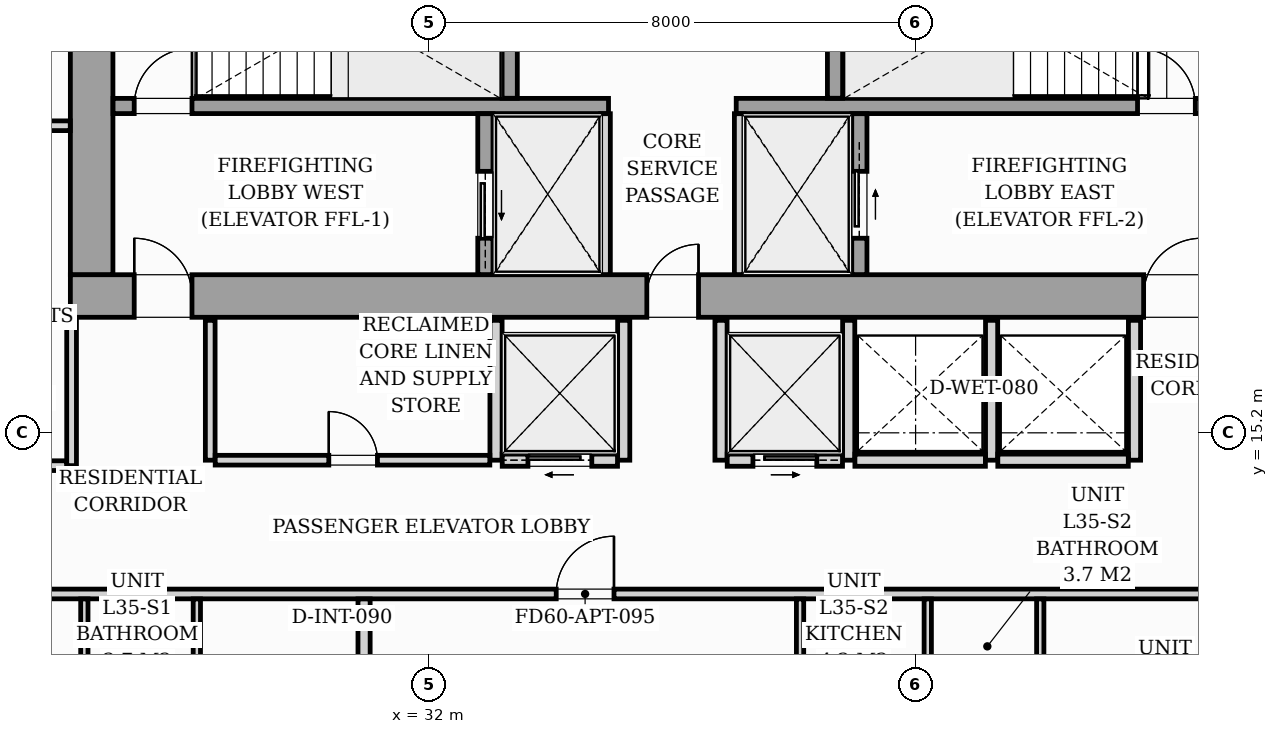
"""IFC4 building model, lengths in metres.
Left out: names, types, materials, properties, quantities, classifications, styles, units other than length and angle.
Written with IfcOpenShell. Run it as: python <this file> out.ifc"""

import sys

from ifc_helpers import new_model, si_unit, direction, frame, frame_2d, origin, origin_2d, place, context, subcontext, project, spatial, rectangle, i_section, extrude, source, transform, mapped, element, fill, save


model = new_model("IFC4")
c1 = context("Model", 3, precision=1e-05, world=origin(), true_north=direction((0.0, 1.0)))
c2 = subcontext(c1, "Body", "Model", "MODEL_VIEW")
j1 = project(units=[si_unit("LENGTHUNIT", "METRE"), si_unit("PLANEANGLEUNIT", "RADIAN")], contexts=[c1])
p1 = place(None, origin())
s1 = spatial("IfcSite", under=j1, at=p1, CompositionType="ELEMENT")
p2 = place(p1, origin())
s2 = spatial("IfcBuilding", under=s1, at=p2, CompositionType="ELEMENT")
p3 = place(p2, frame((0.0, 0.0, 124.6)))
s3 = spatial("IfcBuildingStorey", under=s2, at=p3, CompositionType="ELEMENT", Elevation=124.6)
m1 = source(origin(), c2, "Body", "SweptSolid", [
    extrude(i_section(OverallWidth=0.421, OverallDepth=0.465, WebThickness=0.045, FlangeThickness=0.073, FilletRadius=0.018, at=origin_2d()), origin(), (0.0, 0.0, 1.0), 3.196),
])
for number, where, z_axis, x_axis in (
    (1, (26.4, 17.4, 0.002), (0.0, 0.0, 1.0), (1.0, 0.0, 0.0)),
    (2, (33.12, 17.4, 0.002), (0.0, 0.0, 1.0), (1.0, 0.0, 0.0)),
    (3, (38.88, 17.4, 0.002), (0.0, 0.0, 1.0), (1.0, 0.0, 0.0)),
):
    element("IfcColumn", number, at=place(p3, frame(where, z_axis=z_axis, x_axis=x_axis)), inside=s3, PredefinedType="PILASTER", context=c2, shape_type="MappedRepresentation", body=[
        mapped(m1, transform((0.0, 0.0, 0.0), scale=1.0)),
    ])
p4 = place(p3, frame((26.1, 17.45, 0.0), z_axis=(0.0, 0.0, 1.0), x_axis=(1.0, 0.0, 0.0)))
e4 = element("IfcWall", 4, at=p4, inside=s3, PredefinedType="SHEAR", context=c2, shape_type="SweptSolid", body=[
    extrude(rectangle(XDim=19.8, YDim=0.7, at=frame_2d((9.9, 0.0))), origin(), (0.0, 0.0, 1.0), 3.2),
])
p5 = place(p4, frame((1.05, 0.0, 0.0)))
e5 = element("IfcOpeningElement", 5, at=p5, cuts=e4, PredefinedType="OPENING", context=c2, shape_type="SweptSolid", body=[
    extrude(rectangle(XDim=0.95, YDim=2.06, at=frame_2d((0.475, 1.03))), frame((0.0, 0.36, 0.0), z_axis=(0.0, -1.0, 0.0), x_axis=(1.0, 0.0, 0.0)), (0.0, 0.0, 1.0), 0.72),
])
p6 = place(p4, frame((9.48, 0.0, 0.0)))
e6 = element("IfcOpeningElement", 6, at=p6, cuts=e4, PredefinedType="OPENING", context=c2, shape_type="SweptSolid", body=[
    extrude(rectangle(XDim=0.85, YDim=2.0, at=frame_2d((0.425, 1.0))), frame((0.0, 0.36, 0.0), z_axis=(0.0, -1.0, 0.0), x_axis=(1.0, 0.0, 0.0)), (0.0, 0.0, 1.0), 0.72),
])
p7 = place(p4, frame((17.65, 0.0, 0.0)))
e7 = element("IfcOpeningElement", 7, at=p7, cuts=e4, PredefinedType="OPENING", context=c2, shape_type="SweptSolid", body=[
    extrude(rectangle(XDim=0.95, YDim=2.06, at=frame_2d((0.475, 1.03))), frame((0.0, 0.36, 0.0), z_axis=(0.0, -1.0, 0.0), x_axis=(1.0, 0.0, 0.0)), (0.0, 0.0, 1.0), 0.72),
])
p8 = place(p3, frame((26.45, 17.802, 0.0), z_axis=(0.0, 0.0, 1.0), x_axis=(0.0, 1.0, 0.0)))
e8 = element("IfcWall", 8, at=p8, inside=s3, PredefinedType="SHEAR", context=c2, shape_type="SweptSolid", body=[
    extrude(rectangle(XDim=5.796, YDim=0.7, at=frame_2d((2.898, 0.0))), origin(), (0.0, 0.0, 1.0), 3.2),
])
p9 = place(p3, frame((26.802, 20.575, 0.0), z_axis=(0.0, 0.0, 1.0), x_axis=(1.0, 0.0, 0.0)))
e9 = element("IfcWall", 9, at=p9, inside=s3, PredefinedType="SOLIDWALL", context=c2, shape_type="SweptSolid", body=[
    extrude(rectangle(XDim=8.148, YDim=0.25, at=frame_2d((4.074, 0.0))), origin(), (0.0, 0.0, 1.0), 3.2),
])
p10 = place(p9, frame((0.348, 0.0, 0.0)))
e10 = element("IfcOpeningElement", 10, at=p10, cuts=e9, PredefinedType="OPENING", context=c2, shape_type="SweptSolid", body=[
    extrude(rectangle(XDim=0.95, YDim=2.06, at=frame_2d((0.475, 1.03))), frame((0.0, 0.135, 0.0), z_axis=(0.0, -1.0, 0.0), x_axis=(1.0, 0.0, 0.0)), (0.0, 0.0, 1.0), 0.27),
])
p11 = place(p3, frame((37.05, 20.575, 0.0), z_axis=(0.0, 0.0, 1.0), x_axis=(1.0, 0.0, 0.0)))
e11 = element("IfcWall", 11, at=p11, inside=s3, PredefinedType="SOLIDWALL", context=c2, shape_type="SweptSolid", body=[
    extrude(rectangle(XDim=8.148, YDim=0.25, at=frame_2d((4.074, 0.0))), origin(), (0.0, 0.0, 1.0), 3.2),
])
p12 = place(p11, frame((6.6, 0.0, 0.0)))
e12 = element("IfcOpeningElement", 12, at=p12, cuts=e11, PredefinedType="OPENING", context=c2, shape_type="SweptSolid", body=[
    extrude(rectangle(XDim=0.95, YDim=2.06, at=frame_2d((0.475, 1.03))), frame((0.0, 0.135, 0.0), z_axis=(0.0, -1.0, 0.0), x_axis=(1.0, 0.0, 0.0)), (0.0, 0.0, 1.0), 0.27),
])
for number, where, z_axis, x_axis in (
    (13, (33.325, 20.702, 0.0), (0.0, 0.0, 1.0), (0.0, 1.0, 0.0)),
    (14, (38.675, 20.702, 0.0), (0.0, 0.0, 1.0), (0.0, 1.0, 0.0)),
):
    element("IfcWall", number, at=place(p3, frame(where, z_axis=z_axis, x_axis=x_axis)), inside=s3, PredefinedType="SOLIDWALL", context=c2, shape_type="SweptSolid", body=[
        extrude(rectangle(XDim=2.896, YDim=0.25, at=frame_2d((1.448, 0.0))), origin(), (0.0, 0.0, 1.0), 3.2),
    ])
p13 = place(p3, frame((32.925, 17.802, 0.0), z_axis=(0.0, 0.0, 1.0), x_axis=(0.0, 1.0, 0.0)))
e15 = element("IfcWall", 15, at=p13, inside=s3, PredefinedType="SOLIDWALL", context=c2, shape_type="SweptSolid", body=[
    extrude(rectangle(XDim=2.646, YDim=0.25, at=frame_2d((1.323, 0.0))), origin(), (0.0, 0.0, 1.0), 3.2),
])
p14 = place(p13, frame((0.598, 0.0, 0.0)))
e16 = element("IfcOpeningElement", 16, at=p14, cuts=e15, PredefinedType="OPENING", context=c2, shape_type="SweptSolid", body=[
    extrude(rectangle(XDim=1.1, YDim=2.08, at=frame_2d((0.55, 1.04))), frame((0.0, 0.135, 0.0), z_axis=(0.0, -1.0, 0.0), x_axis=(1.0, 0.0, 0.0)), (0.0, 0.0, 1.0), 0.27),
])
for number, where, z_axis, x_axis in (
    (17, (34.9, 17.802, 0.0), (0.0, 0.0, 1.0), (0.0, 1.0, 0.0)),
    (18, (37.1, 17.802, 0.0), (0.0, 0.0, 1.0), (0.0, 1.0, 0.0)),
):
    element("IfcWall", number, at=place(p3, frame(where, z_axis=z_axis, x_axis=x_axis)), inside=s3, PredefinedType="PARTITIONING", context=c2, shape_type="SweptSolid", body=[
        extrude(rectangle(XDim=2.646, YDim=0.16, at=frame_2d((1.323, 0.0))), origin(), (0.0, 0.0, 1.0), 2.94),
    ])
p15 = place(p3, frame((39.075, 17.802, 0.0), z_axis=(0.0, 0.0, 1.0), x_axis=(0.0, 1.0, 0.0)))
e19 = element("IfcWall", 19, at=p15, inside=s3, PredefinedType="SOLIDWALL", context=c2, shape_type="SweptSolid", body=[
    extrude(rectangle(XDim=2.646, YDim=0.25, at=frame_2d((1.323, 0.0))), origin(), (0.0, 0.0, 1.0), 3.2),
])
p16 = place(p15, frame((0.598, 0.0, 0.0)))
e20 = element("IfcOpeningElement", 20, at=p16, cuts=e19, PredefinedType="OPENING", context=c2, shape_type="SweptSolid", body=[
    extrude(rectangle(XDim=1.1, YDim=2.08, at=frame_2d((0.55, 1.04))), frame((0.0, 0.135, 0.0), z_axis=(0.0, -1.0, 0.0), x_axis=(1.0, 0.0, 0.0)), (0.0, 0.0, 1.0), 0.27),
])
p17 = place(p3, frame((28.4, 14.75, 0.0), z_axis=(0.0, 0.0, 1.0), x_axis=(0.0, 1.0, 0.0)))
e21 = element("IfcWall", 21, at=p17, inside=s3, PredefinedType="PARTITIONING", context=c2, shape_type="SweptSolid", body=[
    extrude(rectangle(XDim=2.3, YDim=0.16, at=frame_2d((1.15, 0.0))), origin(), (0.0, 0.0, 1.0), 2.94),
])
p18 = place(p3, frame((33.1, 14.75, 0.0), z_axis=(0.0, 0.0, 1.0), x_axis=(0.0, 1.0, 0.0)))
e22 = element("IfcWall", 22, at=p18, inside=s3, PredefinedType="PARTITIONING", context=c2, shape_type="SweptSolid", body=[
    extrude(rectangle(XDim=2.3, YDim=0.2, at=frame_2d((1.15, 0.0))), origin(), (0.0, 0.0, 1.0), 2.94),
])
p19 = place(p3, frame((28.482, 14.75, 0.0), z_axis=(0.0, 0.0, 1.0), x_axis=(1.0, 0.0, 0.0)))
e23 = element("IfcWall", 23, at=p19, inside=s3, PredefinedType="PARTITIONING", context=c2, shape_type="SweptSolid", body=[
    extrude(rectangle(XDim=4.516, YDim=0.16, at=frame_2d((2.258, 0.0))), origin(), (0.0, 0.0, 1.0), 2.94),
])
p20 = place(p19, frame((1.868, 0.0, 0.0)))
e24 = element("IfcOpeningElement", 24, at=p20, cuts=e23, PredefinedType="OPENING", context=c2, shape_type="SweptSolid", body=[
    extrude(rectangle(XDim=0.8, YDim=2.05, at=frame_2d((0.4, 1.025))), frame((0.0, 0.09, 0.0), z_axis=(0.0, -1.0, 0.0), x_axis=(1.0, 0.0, 0.0)), (0.0, 0.0, 1.0), 0.18),
])
p21 = place(p3, frame((35.2, 14.75, 0.0), z_axis=(0.0, 0.0, 1.0), x_axis=(0.0, 1.0, 0.0)))
e25 = element("IfcWall", 25, at=p21, inside=s3, PredefinedType="PARTITIONING", context=c2, shape_type="SweptSolid", body=[
    extrude(rectangle(XDim=2.3, YDim=0.2, at=frame_2d((1.15, 0.0))), origin(), (0.0, 0.0, 1.0), 2.94),
])
p22 = place(p3, frame((33.202, 14.75, 0.0), z_axis=(0.0, 0.0, 1.0), x_axis=(1.0, 0.0, 0.0)))
e26 = element("IfcWall", 26, at=p22, inside=s3, PredefinedType="PARTITIONING", context=c2, shape_type="SweptSolid", body=[
    extrude(rectangle(XDim=1.896, YDim=0.2, at=frame_2d((0.948, 0.0))), origin(), (0.0, 0.0, 1.0), 2.94),
])
p23 = place(p22, frame((0.423, 0.0, 0.0)))
e27 = element("IfcOpeningElement", 27, at=p23, cuts=e26, PredefinedType="OPENING", context=c2, shape_type="SweptSolid", body=[
    extrude(rectangle(XDim=1.05, YDim=2.08, at=frame_2d((0.525, 1.04))), frame((0.0, 0.11, 0.0), z_axis=(0.0, -1.0, 0.0), x_axis=(1.0, 0.0, 0.0)), (0.0, 0.0, 1.0), 0.22),
])
for number, where, z_axis, x_axis in (
    (28, (36.8, 14.75, 0.0), (0.0, 0.0, 1.0), (0.0, 1.0, 0.0)),
    (29, (38.9, 14.75, 0.0), (0.0, 0.0, 1.0), (0.0, 1.0, 0.0)),
):
    element("IfcWall", number, at=place(p3, frame(where, z_axis=z_axis, x_axis=x_axis)), inside=s3, PredefinedType="PARTITIONING", context=c2, shape_type="SweptSolid", body=[
        extrude(rectangle(XDim=2.3, YDim=0.2, at=frame_2d((1.15, 0.0))), origin(), (0.0, 0.0, 1.0), 2.94),
    ])
p24 = place(p3, frame((36.902, 14.75, 0.0), z_axis=(0.0, 0.0, 1.0), x_axis=(1.0, 0.0, 0.0)))
e30 = element("IfcWall", 30, at=p24, inside=s3, PredefinedType="PARTITIONING", context=c2, shape_type="SweptSolid", body=[
    extrude(rectangle(XDim=1.896, YDim=0.2, at=frame_2d((0.948, 0.0))), origin(), (0.0, 0.0, 1.0), 2.94),
])
p25 = place(p24, frame((0.423, 0.0, 0.0)))
e31 = element("IfcOpeningElement", 31, at=p25, cuts=e30, PredefinedType="OPENING", context=c2, shape_type="SweptSolid", body=[
    extrude(rectangle(XDim=1.05, YDim=2.08, at=frame_2d((0.525, 1.04))), frame((0.0, 0.11, 0.0), z_axis=(0.0, -1.0, 0.0), x_axis=(1.0, 0.0, 0.0)), (0.0, 0.0, 1.0), 0.22),
])
for number, where, z_axis, x_axis in (
    (32, (41.25, 14.75, 0.0), (0.0, 0.0, 1.0), (0.0, 1.0, 0.0)),
    (33, (43.6, 14.75, 0.0), (0.0, 0.0, 1.0), (0.0, 1.0, 0.0)),
):
    element("IfcWall", number, at=place(p3, frame(where, z_axis=z_axis, x_axis=x_axis)), inside=s3, PredefinedType="PARTITIONING", context=c2, shape_type="SweptSolid", body=[
        extrude(rectangle(XDim=2.3, YDim=0.2, at=frame_2d((1.15, 0.0))), origin(), (0.0, 0.0, 1.0), 2.94),
    ])
for number, where, z_axis, x_axis in (
    (34, (39.002, 14.75, 0.0), (0.0, 0.0, 1.0), (1.0, 0.0, 0.0)),
    (35, (41.352, 14.75, 0.0), (0.0, 0.0, 1.0), (1.0, 0.0, 0.0)),
):
    element("IfcWall", number, at=place(p3, frame(where, z_axis=z_axis, x_axis=x_axis)), inside=s3, PredefinedType="PARTITIONING", context=c2, shape_type="SweptSolid", body=[
        extrude(rectangle(XDim=2.146, YDim=0.2, at=frame_2d((1.073, 0.0))), origin(), (0.0, 0.0, 1.0), 2.94),
    ])
p26 = place(p3, frame((22.05, 12.55, 0.0), z_axis=(0.0, 0.0, 1.0), x_axis=(1.0, 0.0, 0.0)))
e36 = element("IfcWall", 36, at=p26, inside=s3, PredefinedType="PARTITIONING", context=c2, shape_type="SweptSolid", body=[
    extrude(rectangle(XDim=23.83, YDim=0.16, at=frame_2d((11.915, 0.0))), origin(), (0.0, 0.0, 1.0), 2.94),
])
p27 = place(p26, frame((0.655, 0.0, 0.0)))
e37 = element("IfcOpeningElement", 37, at=p27, cuts=e36, PredefinedType="OPENING", context=c2, shape_type="SweptSolid", body=[
    extrude(rectangle(XDim=0.95, YDim=2.06, at=frame_2d((0.475, 1.03))), frame((0.0, 0.09, 0.0), z_axis=(0.0, -1.0, 0.0), x_axis=(1.0, 0.0, 0.0)), (0.0, 0.0, 1.0), 0.18),
])
p28 = place(p26, frame((12.04, 0.0, 0.0)))
e38 = element("IfcOpeningElement", 38, at=p28, cuts=e36, PredefinedType="OPENING", context=c2, shape_type="SweptSolid", body=[
    extrude(rectangle(XDim=0.95, YDim=2.06, at=frame_2d((0.475, 1.03))), frame((0.0, 0.09, 0.0), z_axis=(0.0, -1.0, 0.0), x_axis=(1.0, 0.0, 0.0)), (0.0, 0.0, 1.0), 0.18),
])
p29 = place(p3, frame((28.18, 7.48, 0.0), z_axis=(0.0, 0.0, 1.0), x_axis=(0.0, 1.0, 0.0)))
e39 = element("IfcWall", 39, at=p29, inside=s3, PredefinedType="PARTITIONING", context=c2, shape_type="SweptSolid", body=[
    extrude(rectangle(XDim=4.988, YDim=0.12, at=frame_2d((2.494, 0.0))), origin(), (0.0, 0.0, 1.0), 2.94),
])
p30 = place(p29, frame((1.835, 0.0, 0.0)))
e40 = element("IfcOpeningElement", 40, at=p30, cuts=e39, PredefinedType="OPENING", context=c2, shape_type="SweptSolid", body=[
    extrude(rectangle(XDim=0.9, YDim=2.05, at=frame_2d((0.45, 1.025))), frame((0.0, 0.07, 0.0), z_axis=(0.0, -1.0, 0.0), x_axis=(1.0, 0.0, 0.0)), (0.0, 0.0, 1.0), 0.14),
])
p31 = place(p3, frame((26.33, 10.362, 0.0), z_axis=(0.0, 0.0, 1.0), x_axis=(0.0, 1.0, 0.0)))
e41 = element("IfcWall", 41, at=p31, inside=s3, PredefinedType="PARTITIONING", context=c2, shape_type="SweptSolid", body=[
    extrude(rectangle(XDim=2.106, YDim=0.12, at=frame_2d((1.053, 0.0))), origin(), (0.0, 0.0, 1.0), 2.94),
])
p32 = place(p3, frame((30.93, 10.401, 0.0), z_axis=(0.0, 0.0, 1.0), x_axis=(0.0, 1.0, 0.0)))
e42 = element("IfcWall", 42, at=p32, inside=s3, PredefinedType="PARTITIONING", context=c2, shape_type="SweptSolid", body=[
    extrude(rectangle(XDim=2.067, YDim=0.2, at=frame_2d((1.034, 0.0))), origin(), (0.0, 0.0, 1.0), 2.94),
])
p33 = place(p3, frame((42.05, 6.327, 0.0), z_axis=(0.0, 0.0, 1.0), x_axis=(0.0, 1.0, 0.0)))
e43 = element("IfcWall", 43, at=p33, inside=s3, PredefinedType="PARTITIONING", context=c2, shape_type="SweptSolid", body=[
    extrude(rectangle(XDim=6.141, YDim=0.12, at=frame_2d((3.07, 0.0))), origin(), (0.0, 0.0, 1.0), 2.94),
])
p34 = place(p33, frame((2.873, 0.0, 0.0)))
e44 = element("IfcOpeningElement", 44, at=p34, cuts=e43, PredefinedType="OPENING", context=c2, shape_type="SweptSolid", body=[
    extrude(rectangle(XDim=0.9, YDim=2.05, at=frame_2d((0.45, 1.025))), frame((0.0, 0.07, 0.0), z_axis=(0.0, -1.0, 0.0), x_axis=(1.0, 0.0, 0.0)), (0.0, 0.0, 1.0), 0.14),
])
for number, where, z_axis, x_axis in (
    (45, (40.2, 10.362, 0.0), (0.0, 0.0, 1.0), (0.0, 1.0, 0.0)),
    (46, (38.1, 10.362, 0.0), (0.0, 0.0, 1.0), (0.0, 1.0, 0.0)),
):
    element("IfcWall", number, at=place(p3, frame(where, z_axis=z_axis, x_axis=x_axis)), inside=s3, PredefinedType="PARTITIONING", context=c2, shape_type="SweptSolid", body=[
        extrude(rectangle(XDim=2.106, YDim=0.12, at=frame_2d((1.053, 0.0))), origin(), (0.0, 0.0, 1.0), 2.94),
    ])
p35 = place(p3, frame((24.182, 20.25, 0.0), z_axis=(0.0, 0.0, 1.0), x_axis=(1.0, 0.0, 0.0)))
e47 = element("IfcWall", 47, at=p35, inside=s3, PredefinedType="PARTITIONING", context=c2, shape_type="SweptSolid", body=[
    extrude(rectangle(XDim=1.916, YDim=0.16, at=frame_2d((0.958, 0.0))), origin(), (0.0, 0.0, 1.0), 2.94),
])
p36 = place(p3, frame((26.12, 14.66, 0.0), z_axis=(0.0, 0.0, 1.0), x_axis=(0.0, 1.0, 0.0)))
e48 = element("IfcWall", 48, at=p36, inside=s3, PredefinedType="PARTITIONING", context=c2, shape_type="SweptSolid", body=[
    extrude(rectangle(XDim=2.438, YDim=0.16, at=frame_2d((1.219, 0.0))), origin(), (0.0, 0.0, 1.0), 2.94),
])
p37 = place(p3, frame((24.182, 14.66, 0.0), z_axis=(0.0, 0.0, 1.0), x_axis=(1.0, 0.0, 0.0)))
e49 = element("IfcWall", 49, at=p37, inside=s3, PredefinedType="PARTITIONING", context=c2, shape_type="SweptSolid", body=[
    extrude(rectangle(XDim=1.856, YDim=0.16, at=frame_2d((0.928, 0.0))), origin(), (0.0, 0.0, 1.0), 2.94),
])
m2 = source(origin(), c2, "Body", "SweptSolid", [
    extrude(rectangle(XDim=0.95, YDim=2.06, at=frame_2d((0.475, 1.03))), frame((0.0, 0.025, 0.0), z_axis=(0.0, -1.0, 0.0), x_axis=(1.0, 0.0, 0.0)), (0.0, 0.0, 1.0), 0.05),
])
p38 = place(p5, origin())
e50 = element("IfcDoor", 50, at=p38, inside=s3, OperationType="SINGLE_SWING_LEFT", PredefinedType="DOOR", context=c2, shape_type="MappedRepresentation", body=[
    mapped(m2, transform((0.0, 0.0, 0.0), scale=1.0)),
])
fill(e5, e50)
m3 = source(origin(), c2, "Body", "SweptSolid", [
    extrude(rectangle(XDim=0.85, YDim=2.0, at=frame_2d((0.425, 1.0))), frame((0.0, 0.025, 0.0), z_axis=(0.0, -1.0, 0.0), x_axis=(1.0, 0.0, 0.0)), (0.0, 0.0, 1.0), 0.05),
])
p39 = place(p6, origin())
e51 = element("IfcDoor", 51, at=p39, inside=s3, OperationType="SINGLE_SWING_RIGHT", PredefinedType="DOOR", context=c2, shape_type="MappedRepresentation", body=[
    mapped(m3, transform((0.0, 0.0, 0.0), scale=1.0)),
])
fill(e6, e51)
p40 = place(p7, origin())
e52 = element("IfcDoor", 52, at=p40, inside=s3, OperationType="SINGLE_SWING_RIGHT", PredefinedType="DOOR", context=c2, shape_type="MappedRepresentation", body=[
    mapped(m2, transform((0.0, 0.0, 0.0), scale=1.0)),
])
fill(e7, e52)
p41 = place(p10, origin())
e53 = element("IfcDoor", 53, at=p41, inside=s3, OperationType="SINGLE_SWING_RIGHT", PredefinedType="DOOR", context=c2, shape_type="MappedRepresentation", body=[
    mapped(m2, transform((0.0, 0.0, 0.0), scale=1.0)),
])
fill(e10, e53)
p42 = place(p12, origin())
e54 = element("IfcDoor", 54, at=p42, inside=s3, OperationType="SINGLE_SWING_LEFT", PredefinedType="DOOR", context=c2, shape_type="MappedRepresentation", body=[
    mapped(m2, transform((0.0, 0.0, 0.0), scale=1.0)),
])
fill(e12, e54)
m4 = source(origin(), c2, "Body", "SweptSolid", [
    extrude(rectangle(XDim=1.1, YDim=2.08, at=frame_2d((0.55, 1.04))), frame((0.0, 0.025, 0.0), z_axis=(0.0, -1.0, 0.0), x_axis=(1.0, 0.0, 0.0)), (0.0, 0.0, 1.0), 0.05),
])
p43 = place(p14, origin())
e55 = element("IfcDoor", 55, at=p43, inside=s3, OperationType="SLIDING_TO_LEFT", PredefinedType="DOOR", context=c2, shape_type="MappedRepresentation", body=[
    mapped(m4, transform((0.0, 0.0, 0.0), scale=1.0)),
])
fill(e16, e55)
p44 = place(p16, origin())
e56 = element("IfcDoor", 56, at=p44, inside=s3, OperationType="SLIDING_TO_RIGHT", PredefinedType="DOOR", context=c2, shape_type="MappedRepresentation", body=[
    mapped(m4, transform((0.0, 0.0, 0.0), scale=1.0)),
])
fill(e20, e56)
m5 = source(origin(), c2, "Body", "SweptSolid", [
    extrude(rectangle(XDim=0.8, YDim=2.05, at=frame_2d((0.4, 1.025))), frame((0.0, 0.025, 0.0), z_axis=(0.0, -1.0, 0.0), x_axis=(1.0, 0.0, 0.0)), (0.0, 0.0, 1.0), 0.05),
])
p45 = place(p20, origin())
e57 = element("IfcDoor", 57, at=p45, inside=s3, OperationType="SINGLE_SWING_LEFT", PredefinedType="DOOR", context=c2, shape_type="MappedRepresentation", body=[
    mapped(m5, transform((0.0, 0.0, 0.0), scale=1.0)),
])
fill(e24, e57)
m6 = source(origin(), c2, "Body", "SweptSolid", [
    extrude(rectangle(XDim=1.05, YDim=2.08, at=frame_2d((0.525, 1.04))), frame((0.0, 0.025, 0.0), z_axis=(0.0, -1.0, 0.0), x_axis=(1.0, 0.0, 0.0)), (0.0, 0.0, 1.0), 0.05),
])
p46 = place(p23, origin())
e58 = element("IfcDoor", 58, at=p46, inside=s3, OperationType="SLIDING_TO_LEFT", PredefinedType="DOOR", context=c2, shape_type="MappedRepresentation", body=[
    mapped(m6, transform((0.0, 0.0, 0.0), scale=1.0)),
])
fill(e27, e58)
p47 = place(p25, origin())
e59 = element("IfcDoor", 59, at=p47, inside=s3, OperationType="SLIDING_TO_RIGHT", PredefinedType="DOOR", context=c2, shape_type="MappedRepresentation", body=[
    mapped(m6, transform((0.0, 0.0, 0.0), scale=1.0)),
])
fill(e31, e59)
m7 = source(origin(), c2, "Body", "SweptSolid", [
    extrude(rectangle(XDim=0.95, YDim=2.06, at=frame_2d((0.475, 1.03))), frame((0.0, 0.025, 0.0), z_axis=(0.0, -1.0, 0.0), x_axis=(1.0, 0.0, 0.0)), (0.0, 0.0, 1.0), 0.05),
])
p48 = place(p28, origin())
e60 = element("IfcDoor", 60, at=p48, inside=s3, OperationType="SINGLE_SWING_RIGHT", PredefinedType="DOOR", context=c2, shape_type="MappedRepresentation", body=[
    mapped(m7, transform((0.0, 0.0, 0.0), scale=1.0)),
])
fill(e38, e60)
save(model, sys.argv[1])
